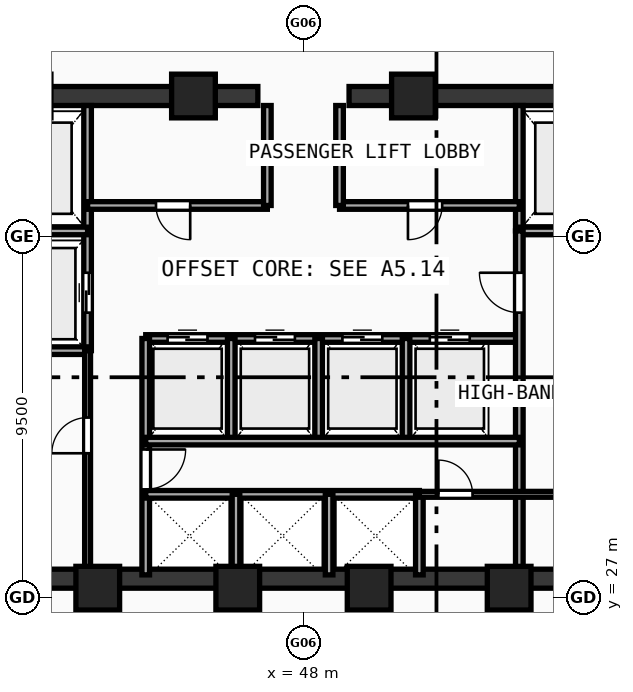
"""IFC4 building model, lengths in metres.
Left out: names, types, materials, properties, quantities, classifications, styles, units other than length and angle.
Written with IfcOpenShell. Run it as: python <this file> out.ifc"""

import sys

from ifc_helpers import new_model, si_unit, direction, frame, frame_2d, origin, origin_with_axes, origin_2d, place, context, subcontext, project, spatial, rectangle, hollow_rectangle, extrude, source, transform, mapped, element, fill, save


model = new_model("IFC4")
c1 = context("Model", 3, precision=1e-05, world=origin(), true_north=direction((0.0, 1.0)))
c2 = subcontext(c1, "Body", "Model", "MODEL_VIEW")
j1 = project(units=[si_unit("LENGTHUNIT", "METRE"), si_unit("PLANEANGLEUNIT", "RADIAN")], contexts=[c1])
p1 = place(None, origin())
s1 = spatial("IfcSite", under=j1, at=p1, CompositionType="ELEMENT")
p2 = place(p1, origin())
s2 = spatial("IfcBuilding", under=s1, at=p2, CompositionType="ELEMENT")
p3 = place(p2, frame((0.0, 0.0, 215.16)))
s3 = spatial("IfcBuildingStorey", under=s2, at=p3, CompositionType="ELEMENT", Elevation=215.16)
p4 = place(p3, frame((35.55, 27.5, 0.0), z_axis=(0.0, 0.0, 1.0), x_axis=(1.0, 0.0, 0.0)))
e1 = element("IfcWall", 1, at=p4, inside=s3, PredefinedType="SHEAR", context=c2, shape_type="SweptSolid", body=[
    extrude(rectangle(XDim=24.9, YDim=0.5, at=frame_2d((12.45, 0.0))), origin(), (0.0, 0.0, 1.0), 3.52),
])
p5 = place(p3, frame((35.55, 40.2, 0.0), z_axis=(0.0, 0.0, 1.0), x_axis=(1.0, 0.0, 0.0)))
e2 = element("IfcWall", 2, at=p5, inside=s3, PredefinedType="SHEAR", context=c2, shape_type="SweptSolid", body=[
    extrude(rectangle(XDim=11.25, YDim=0.5, at=frame_2d((5.625, 0.0))), origin(), (0.0, 0.0, 1.0), 3.52),
])
p6 = place(p5, frame((1.6, 0.0, 0.0)))
e3 = element("IfcOpeningElement", 3, at=p6, cuts=e2, PredefinedType="OPENING", context=c2, shape_type="SweptSolid", body=[
    extrude(rectangle(XDim=1.05, YDim=2.1, at=frame_2d((0.525, 1.05))), frame((0.0, 0.26, 0.0), z_axis=(0.0, -1.0, 0.0), x_axis=(1.0, 0.0, 0.0)), (0.0, 0.0, 1.0), 0.52),
])
p7 = place(p3, frame((49.2, 40.2, 0.0), z_axis=(0.0, 0.0, 1.0), x_axis=(1.0, 0.0, 0.0)))
e4 = element("IfcWall", 4, at=p7, inside=s3, PredefinedType="SHEAR", context=c2, shape_type="SweptSolid", body=[
    extrude(rectangle(XDim=11.25, YDim=0.5, at=frame_2d((5.625, 0.0))), origin(), (0.0, 0.0, 1.0), 3.52),
])
p8 = place(p7, frame((8.6, 0.0, 0.0)))
e5 = element("IfcOpeningElement", 5, at=p8, cuts=e4, PredefinedType="OPENING", context=c2, shape_type="SweptSolid", body=[
    extrude(rectangle(XDim=1.05, YDim=2.1, at=frame_2d((0.525, 1.05))), frame((0.0, 0.26, 0.0), z_axis=(0.0, -1.0, 0.0), x_axis=(1.0, 0.0, 0.0)), (0.0, 0.0, 1.0), 0.52),
])
m1 = source(origin(), c2, "Body", "SweptSolid", [
    extrude(hollow_rectangle(XDim=1.15, YDim=1.15, WallThickness=0.048, at=origin_2d()), origin(), (0.0, 0.0, 1.0), 3.78),
])
for number, where, z_axis, x_axis in (
    (6, (42.588, 27.25, -0.26), (0.0, 0.0, 1.0), (1.0, 0.0, 0.0)),
    (7, (46.272, 27.25, -0.26), (0.0, 0.0, 1.0), (1.0, 0.0, 0.0)),
    (8, (49.729, 27.25, -0.26), (0.0, 0.0, 1.0), (1.0, 0.0, 0.0)),
    (9, (53.412, 27.25, -0.26), (0.0, 0.0, 1.0), (1.0, 0.0, 0.0)),
    (10, (50.894, 40.2, -0.26), (0.0, 0.0, 1.0), (1.0, 0.0, 0.0)),
    (11, (45.106, 40.2, -0.26), (0.0, 0.0, 1.0), (1.0, 0.0, 0.0)),
):
    element("IfcColumn", number, at=place(p3, frame(where, z_axis=z_axis, x_axis=x_axis)), inside=s3, PredefinedType="COLUMN", context=c2, shape_type="MappedRepresentation", body=[
        mapped(m1, transform((0.0, 0.0, 0.0), scale=1.0)),
    ])
p9 = place(p3, frame((42.32, 33.5, 0.0), z_axis=(0.0, 0.0, 1.0), x_axis=(0.0, 1.0, 0.0)))
e12 = element("IfcWall", 12, at=p9, inside=s3, PredefinedType="SOLIDWALL", context=c2, shape_type="SweptSolid", body=[
    extrude(rectangle(XDim=6.45, YDim=0.2, at=frame_2d((3.225, 0.0))), origin(), (0.0, 0.0, 1.0), 3.52),
])
p10 = place(p9, frame((1.0, 0.0, 0.0)))
e13 = element("IfcOpeningElement", 13, at=p10, cuts=e12, PredefinedType="OPENING", context=c2, shape_type="SweptSolid", body=[
    extrude(rectangle(XDim=1.05, YDim=2.1, at=frame_2d((0.525, 1.05))), frame((0.0, 0.11, 0.0), z_axis=(0.0, -1.0, 0.0), x_axis=(1.0, 0.0, 0.0)), (0.0, 0.0, 1.0), 0.22),
])
for number, where, z_axis, x_axis in (
    (14, (39.6, 36.65, 0.0), (0.0, 0.0, 1.0), (1.0, 0.0, 0.0)),
    (15, (39.6, 33.5, 0.0), (0.0, 0.0, 1.0), (1.0, 0.0, 0.0)),
):
    element("IfcWall", number, at=place(p3, frame(where, z_axis=z_axis, x_axis=x_axis)), inside=s3, PredefinedType="SOLIDWALL", context=c2, shape_type="SweptSolid", body=[
        extrude(rectangle(XDim=2.72, YDim=0.2, at=frame_2d((1.36, 0.0))), origin(), (0.0, 0.0, 1.0), 3.52),
    ])
p11 = place(p3, frame((53.68, 36.65, 0.0), z_axis=(0.0, 0.0, 1.0), x_axis=(0.0, 1.0, 0.0)))
e16 = element("IfcWall", 16, at=p11, inside=s3, PredefinedType="SOLIDWALL", context=c2, shape_type="SweptSolid", body=[
    extrude(rectangle(XDim=3.3, YDim=0.2, at=frame_2d((1.65, 0.0))), origin(), (0.0, 0.0, 1.0), 3.52),
])
p12 = place(p3, frame((53.68, 36.65, 0.0), z_axis=(0.0, 0.0, 1.0), x_axis=(1.0, 0.0, 0.0)))
e17 = element("IfcWall", 17, at=p12, inside=s3, PredefinedType="SOLIDWALL", context=c2, shape_type="SweptSolid", body=[
    extrude(rectangle(XDim=2.72, YDim=0.2, at=frame_2d((1.36, 0.0))), origin(), (0.0, 0.0, 1.0), 3.52),
])
p13 = place(p3, frame((42.32, 37.32, 0.0), z_axis=(0.0, 0.0, 1.0), x_axis=(1.0, 0.0, 0.0)))
e18 = element("IfcWall", 18, at=p13, inside=s3, PredefinedType="SOLIDWALL", context=c2, shape_type="SweptSolid", body=[
    extrude(rectangle(XDim=4.73, YDim=0.2, at=frame_2d((2.365, 0.0))), origin(), (0.0, 0.0, 1.0), 3.52),
])
p14 = place(p13, frame((1.8, 0.0, 0.0)))
e19 = element("IfcOpeningElement", 19, at=p14, cuts=e18, PredefinedType="OPENING", context=c2, shape_type="SweptSolid", body=[
    extrude(rectangle(XDim=0.9, YDim=2.1, at=frame_2d((0.45, 1.05))), frame((0.0, 0.11, 0.0), z_axis=(0.0, -1.0, 0.0), x_axis=(1.0, 0.0, 0.0)), (0.0, 0.0, 1.0), 0.22),
])
p15 = place(p3, frame((48.95, 37.32, 0.0), z_axis=(0.0, 0.0, 1.0), x_axis=(1.0, 0.0, 0.0)))
e20 = element("IfcWall", 20, at=p15, inside=s3, PredefinedType="SOLIDWALL", context=c2, shape_type="SweptSolid", body=[
    extrude(rectangle(XDim=4.73, YDim=0.2, at=frame_2d((2.365, 0.0))), origin(), (0.0, 0.0, 1.0), 3.52),
])
p16 = place(p15, frame((1.8, 0.0, 0.0)))
e21 = element("IfcOpeningElement", 21, at=p16, cuts=e20, PredefinedType="OPENING", context=c2, shape_type="SweptSolid", body=[
    extrude(rectangle(XDim=0.9, YDim=2.1, at=frame_2d((0.45, 1.05))), frame((0.0, 0.11, 0.0), z_axis=(0.0, -1.0, 0.0), x_axis=(1.0, 0.0, 0.0)), (0.0, 0.0, 1.0), 0.22),
])
for number, where, z_axis, x_axis in (
    (22, (47.05, 37.32, 0.0), (0.0, 0.0, 1.0), (0.0, 1.0, 0.0)),
    (23, (48.95, 37.32, 0.0), (0.0, 0.0, 1.0), (0.0, 1.0, 0.0)),
):
    element("IfcWall", number, at=place(p3, frame(where, z_axis=z_axis, x_axis=x_axis)), inside=s3, PredefinedType="SOLIDWALL", context=c2, shape_type="SweptSolid", body=[
        extrude(rectangle(XDim=2.63, YDim=0.2, at=frame_2d((1.315, 0.0))), origin(), (0.0, 0.0, 1.0), 3.52),
    ])
p17 = place(p3, frame((43.85, 33.82, 0.0), z_axis=(0.0, 0.0, 1.0), x_axis=(1.0, 0.0, 0.0)))
e24 = element("IfcWall", 24, at=p17, inside=s3, PredefinedType="SOLIDWALL", context=c2, shape_type="SweptSolid", body=[
    extrude(rectangle(XDim=9.83, YDim=0.2, at=frame_2d((4.915, 0.0))), origin(), (0.0, 0.0, 1.0), 3.52),
])
p18 = place(p17, frame((0.575, 0.0, 0.0)))
e25 = element("IfcOpeningElement", 25, at=p18, cuts=e24, PredefinedType="OPENING", context=c2, shape_type="SweptSolid", body=[
    extrude(rectangle(XDim=1.05, YDim=2.1, at=frame_2d((0.525, 1.05))), frame((0.0, 0.11, 0.0), z_axis=(0.0, -1.0, 0.0), x_axis=(1.0, 0.0, 0.0)), (0.0, 0.0, 1.0), 0.22),
])
p19 = place(p17, frame((2.875, 0.0, 0.0)))
e26 = element("IfcOpeningElement", 26, at=p19, cuts=e24, PredefinedType="OPENING", context=c2, shape_type="SweptSolid", body=[
    extrude(rectangle(XDim=1.05, YDim=2.1, at=frame_2d((0.525, 1.05))), frame((0.0, 0.11, 0.0), z_axis=(0.0, -1.0, 0.0), x_axis=(1.0, 0.0, 0.0)), (0.0, 0.0, 1.0), 0.22),
])
p20 = place(p17, frame((5.175, 0.0, 0.0)))
e27 = element("IfcOpeningElement", 27, at=p20, cuts=e24, PredefinedType="OPENING", context=c2, shape_type="SweptSolid", body=[
    extrude(rectangle(XDim=1.05, YDim=2.1, at=frame_2d((0.525, 1.05))), frame((0.0, 0.11, 0.0), z_axis=(0.0, -1.0, 0.0), x_axis=(1.0, 0.0, 0.0)), (0.0, 0.0, 1.0), 0.22),
])
p21 = place(p17, frame((7.475, 0.0, 0.0)))
e28 = element("IfcOpeningElement", 28, at=p21, cuts=e24, PredefinedType="OPENING", context=c2, shape_type="SweptSolid", body=[
    extrude(rectangle(XDim=1.05, YDim=2.1, at=frame_2d((0.525, 1.05))), frame((0.0, 0.11, 0.0), z_axis=(0.0, -1.0, 0.0), x_axis=(1.0, 0.0, 0.0)), (0.0, 0.0, 1.0), 0.22),
])
p22 = place(p3, frame((43.85, 27.6, 0.0), z_axis=(0.0, 0.0, 1.0), x_axis=(0.0, 1.0, 0.0)))
e29 = element("IfcWall", 29, at=p22, inside=s3, PredefinedType="SOLIDWALL", context=c2, shape_type="SweptSolid", body=[
    extrude(rectangle(XDim=6.22, YDim=0.2, at=frame_2d((3.11, 0.0))), origin(), (0.0, 0.0, 1.0), 3.52),
])
p23 = place(p22, frame((2.25, 0.0, 0.0)))
e30 = element("IfcOpeningElement", 30, at=p23, cuts=e29, PredefinedType="OPENING", context=c2, shape_type="SweptSolid", body=[
    extrude(rectangle(XDim=1.05, YDim=2.1, at=frame_2d((0.525, 1.05))), frame((0.0, 0.11, 0.0), z_axis=(0.0, -1.0, 0.0), x_axis=(1.0, 0.0, 0.0)), (0.0, 0.0, 1.0), 0.22),
])
p24 = place(p3, frame((53.68, 27.6, 0.0), z_axis=(0.0, 0.0, 1.0), x_axis=(0.0, 1.0, 0.0)))
e31 = element("IfcWall", 31, at=p24, inside=s3, PredefinedType="SOLIDWALL", context=c2, shape_type="SweptSolid", body=[
    extrude(rectangle(XDim=9.05, YDim=0.2, at=frame_2d((4.525, 0.0))), origin(), (0.0, 0.0, 1.0), 3.52),
])
p25 = place(p24, frame((6.9, 0.0, 0.0)))
e32 = element("IfcOpeningElement", 32, at=p25, cuts=e31, PredefinedType="OPENING", context=c2, shape_type="SweptSolid", body=[
    extrude(rectangle(XDim=1.05, YDim=2.1, at=frame_2d((0.525, 1.05))), frame((0.0, 0.11, 0.0), z_axis=(0.0, -1.0, 0.0), x_axis=(1.0, 0.0, 0.0)), (0.0, 0.0, 1.0), 0.22),
])
for number, where, z_axis, x_axis in (
    (33, (46.1, 31.12, 0.0), (0.0, 0.0, 1.0), (0.0, 1.0, 0.0)),
    (34, (48.4, 31.12, 0.0), (0.0, 0.0, 1.0), (0.0, 1.0, 0.0)),
    (35, (50.7, 31.12, 0.0), (0.0, 0.0, 1.0), (0.0, 1.0, 0.0)),
):
    element("IfcWall", number, at=place(p3, frame(where, z_axis=z_axis, x_axis=x_axis)), inside=s3, PredefinedType="SOLIDWALL", context=c2, shape_type="SweptSolid", body=[
        extrude(rectangle(XDim=2.7, YDim=0.2, at=frame_2d((1.35, 0.0))), origin(), (0.0, 0.0, 1.0), 3.52),
    ])
p26 = place(p3, frame((43.85, 29.72, 0.0), z_axis=(0.0, 0.0, 1.0), x_axis=(1.0, 0.0, 0.0)))
e36 = element("IfcWall", 36, at=p26, inside=s3, PredefinedType="SOLIDWALL", context=c2, shape_type="SweptSolid", body=[
    extrude(rectangle(XDim=7.2, YDim=0.2, at=frame_2d((3.6, 0.0))), origin(), (0.0, 0.0, 1.0), 3.52),
])
p27 = place(p3, frame((51.05, 27.6, 0.0), z_axis=(0.0, 0.0, 1.0), x_axis=(0.0, 1.0, 0.0)))
e37 = element("IfcWall", 37, at=p27, inside=s3, PredefinedType="SOLIDWALL", context=c2, shape_type="SweptSolid", body=[
    extrude(rectangle(XDim=2.12, YDim=0.2, at=frame_2d((1.06, 0.0))), origin(), (0.0, 0.0, 1.0), 3.52),
])
p28 = place(p3, frame((43.85, 31.12, 0.0), z_axis=(0.0, 0.0, 1.0), x_axis=(1.0, 0.0, 0.0)))
e38 = element("IfcWall", 38, at=p28, inside=s3, PredefinedType="SOLIDWALL", context=c2, shape_type="SweptSolid", body=[
    extrude(rectangle(XDim=9.83, YDim=0.2, at=frame_2d((4.915, 0.0))), origin(), (0.0, 0.0, 1.0), 3.52),
])
for number, where, z_axis, x_axis in (
    (39, (46.225, 27.6, 0.0), (0.0, 0.0, 1.0), (0.0, 1.0, 0.0)),
    (40, (48.675, 27.6, 0.0), (0.0, 0.0, 1.0), (0.0, 1.0, 0.0)),
):
    element("IfcWall", number, at=place(p3, frame(where, z_axis=z_axis, x_axis=x_axis)), inside=s3, PredefinedType="SOLIDWALL", context=c2, shape_type="SweptSolid", body=[
        extrude(rectangle(XDim=2.12, YDim=0.2, at=frame_2d((1.06, 0.0))), origin(), (0.0, 0.0, 1.0), 3.52),
    ])
p29 = place(p3, frame((42.32, 27.6, 0.0), z_axis=(0.0, 0.0, 1.0), x_axis=(0.0, 1.0, 0.0)))
e41 = element("IfcWall", 41, at=p29, inside=s3, PredefinedType="PARTITIONING", context=c2, shape_type="SweptSolid", body=[
    extrude(rectangle(XDim=5.9, YDim=0.155, at=frame_2d((2.95, 0.0))), origin(), (0.0, 0.0, 1.0), 3.52),
])
p30 = place(p29, frame((3.2, 0.0, 0.0)))
e42 = element("IfcOpeningElement", 42, at=p30, cuts=e41, PredefinedType="OPENING", context=c2, shape_type="SweptSolid", body=[
    extrude(rectangle(XDim=0.94, YDim=2.1, at=frame_2d((0.47, 1.05))), frame((0.0, 0.087, 0.0), z_axis=(0.0, -1.0, 0.0), x_axis=(1.0, 0.0, 0.0)), (0.0, 0.0, 1.0), 0.175),
])
p31 = place(p3, frame((51.05, 29.72, 0.0), z_axis=(0.0, 0.0, 1.0), x_axis=(1.0, 0.0, 0.0)))
e43 = element("IfcWall", 43, at=p31, inside=s3, PredefinedType="PARTITIONING", context=c2, shape_type="SweptSolid", body=[
    extrude(rectangle(XDim=4.07, YDim=0.155, at=frame_2d((2.035, 0.0))), origin(), (0.0, 0.0, 1.0), 3.52),
])
p32 = place(p31, frame((0.5, 0.0, 0.0)))
e44 = element("IfcOpeningElement", 44, at=p32, cuts=e43, PredefinedType="OPENING", context=c2, shape_type="SweptSolid", body=[
    extrude(rectangle(XDim=0.9, YDim=2.1, at=frame_2d((0.45, 1.05))), frame((0.0, 0.087, 0.0), z_axis=(0.0, -1.0, 0.0), x_axis=(1.0, 0.0, 0.0)), (0.0, 0.0, 1.0), 0.175),
])
m2 = source(origin(), c2, "Body", "SweptSolid", [
    extrude(rectangle(XDim=1.05, YDim=2.1, at=frame_2d((0.525, 1.05))), frame((0.0, 0.025, 0.0), z_axis=(0.0, -1.0, 0.0), x_axis=(1.0, 0.0, 0.0)), (0.0, 0.0, 1.0), 0.05),
])
p33 = place(p10, origin_with_axes())
e45 = element("IfcDoor", 45, at=p33, inside=s3, OperationType="DOUBLE_DOOR_SLIDING", PredefinedType="DOOR", context=c2, shape_type="MappedRepresentation", body=[
    mapped(m2, transform((0.0, 0.0, 0.0), scale=1.0)),
])
fill(e13, e45)
m3 = source(origin(), c2, "Body", "SweptSolid", [
    extrude(rectangle(XDim=0.9, YDim=2.1, at=frame_2d((0.45, 1.05))), frame((0.0, 0.025, 0.0), z_axis=(0.0, -1.0, 0.0), x_axis=(1.0, 0.0, 0.0)), (0.0, 0.0, 1.0), 0.05),
])
p34 = place(p14, frame((0.9, 0.0, 0.0), z_axis=(0.0, 0.0, 1.0), x_axis=(-1.0, 0.0, 0.0)))
e46 = element("IfcDoor", 46, at=p34, inside=s3, OperationType="SINGLE_SWING_LEFT", PredefinedType="DOOR", context=c2, shape_type="MappedRepresentation", body=[
    mapped(m3, transform((0.0, 0.0, 0.0), scale=1.0)),
])
fill(e19, e46)
p35 = place(p16, frame((0.9, 0.0, 0.0), z_axis=(0.0, 0.0, 1.0), x_axis=(-1.0, 0.0, 0.0)))
e47 = element("IfcDoor", 47, at=p35, inside=s3, OperationType="SINGLE_SWING_RIGHT", PredefinedType="DOOR", context=c2, shape_type="MappedRepresentation", body=[
    mapped(m3, transform((0.0, 0.0, 0.0), scale=1.0)),
])
fill(e21, e47)
p36 = place(p18, origin_with_axes())
e48 = element("IfcDoor", 48, at=p36, inside=s3, OperationType="DOUBLE_DOOR_SLIDING", PredefinedType="DOOR", context=c2, shape_type="MappedRepresentation", body=[
    mapped(m2, transform((0.0, 0.0, 0.0), scale=1.0)),
])
fill(e25, e48)
p37 = place(p19, origin_with_axes())
e49 = element("IfcDoor", 49, at=p37, inside=s3, OperationType="DOUBLE_DOOR_SLIDING", PredefinedType="DOOR", context=c2, shape_type="MappedRepresentation", body=[
    mapped(m2, transform((0.0, 0.0, 0.0), scale=1.0)),
])
fill(e26, e49)
p38 = place(p20, origin_with_axes())
e50 = element("IfcDoor", 50, at=p38, inside=s3, OperationType="DOUBLE_DOOR_SLIDING", PredefinedType="DOOR", context=c2, shape_type="MappedRepresentation", body=[
    mapped(m2, transform((0.0, 0.0, 0.0), scale=1.0)),
])
fill(e27, e50)
p39 = place(p21, origin_with_axes())
e51 = element("IfcDoor", 51, at=p39, inside=s3, OperationType="DOUBLE_DOOR_SLIDING", PredefinedType="DOOR", context=c2, shape_type="MappedRepresentation", body=[
    mapped(m2, transform((0.0, 0.0, 0.0), scale=1.0)),
])
fill(e28, e51)
p40 = place(p23, frame((1.05, 0.0, 0.0), z_axis=(0.0, 0.0, 1.0), x_axis=(-1.0, 0.0, 0.0)))
e52 = element("IfcDoor", 52, at=p40, inside=s3, OperationType="SINGLE_SWING_LEFT", PredefinedType="DOOR", context=c2, shape_type="MappedRepresentation", body=[
    mapped(m2, transform((0.0, 0.0, 0.0), scale=1.0)),
])
fill(e30, e52)
p41 = place(p25, origin_with_axes())
e53 = element("IfcDoor", 53, at=p41, inside=s3, OperationType="SINGLE_SWING_RIGHT", PredefinedType="DOOR", context=c2, shape_type="MappedRepresentation", body=[
    mapped(m2, transform((0.0, 0.0, 0.0), scale=1.0)),
])
fill(e32, e53)
m4 = source(origin(), c2, "Body", "SweptSolid", [
    extrude(rectangle(XDim=0.94, YDim=2.1, at=frame_2d((0.47, 1.05))), frame((0.0, 0.025, 0.0), z_axis=(0.0, -1.0, 0.0), x_axis=(1.0, 0.0, 0.0)), (0.0, 0.0, 1.0), 0.05),
])
p42 = place(p30, origin_with_axes())
e54 = element("IfcDoor", 54, at=p42, inside=s3, OperationType="SINGLE_SWING_LEFT", PredefinedType="DOOR", context=c2, shape_type="MappedRepresentation", body=[
    mapped(m4, transform((0.0, 0.0, 0.0), scale=1.0)),
])
fill(e42, e54)
p43 = place(p32, origin_with_axes())
e55 = element("IfcDoor", 55, at=p43, inside=s3, OperationType="SINGLE_SWING_LEFT", PredefinedType="DOOR", context=c2, shape_type="MappedRepresentation", body=[
    mapped(m3, transform((0.0, 0.0, 0.0), scale=1.0)),
])
fill(e44, e55)
save(model, sys.argv[1])
